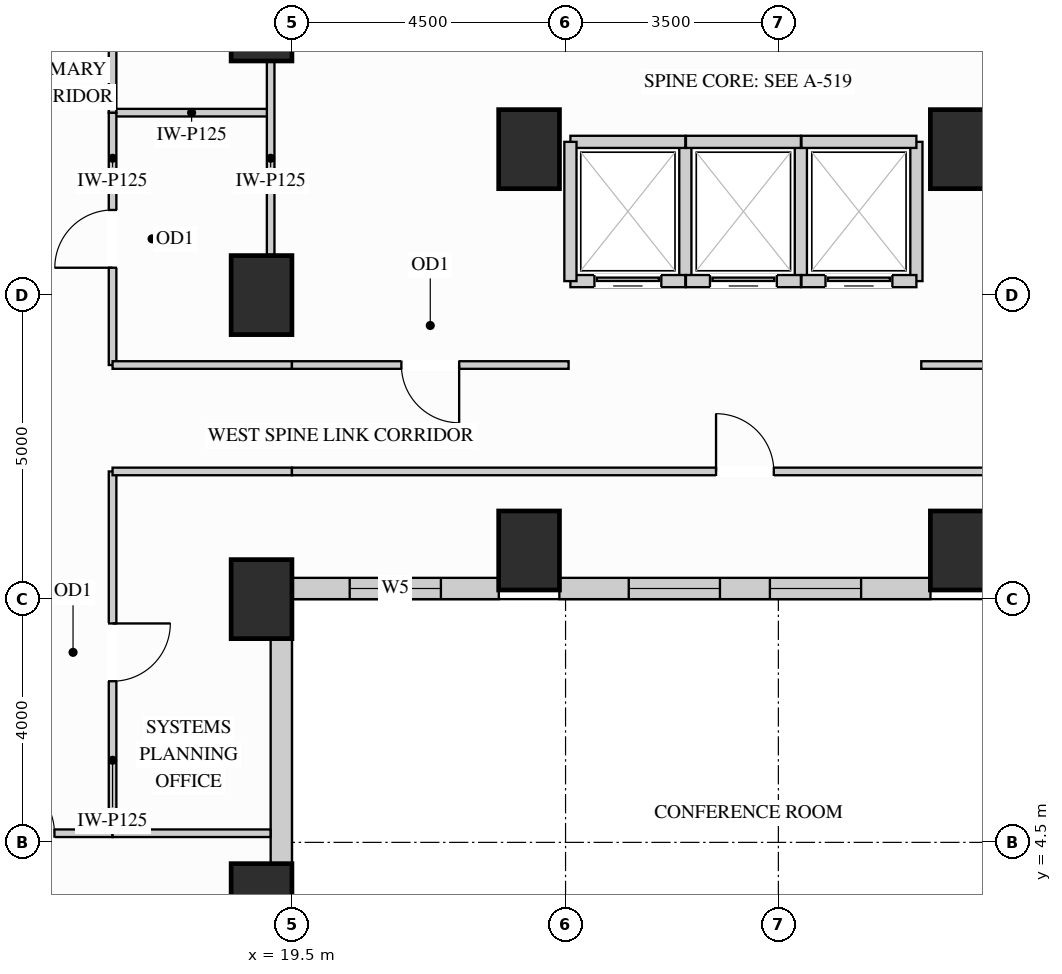
"""IFC4 building model, lengths in metres.
Left out: names, types, materials, properties, quantities, classifications, styles, units other than length and angle.
Written with IfcOpenShell. Run it as: python <this file> out.ifc"""

import sys

from ifc_helpers import new_model, si_unit, direction, frame, frame_2d, origin, origin_2d, place, context, subcontext, project, spatial, rectangle, extrude, source, transform, mapped, element, fill, save


model = new_model("IFC4")
c1 = context("Model", 3, precision=1e-05, world=origin(), true_north=direction((0.0, 1.0)))
c2 = subcontext(c1, "Body", "Model", "MODEL_VIEW")
j1 = project(units=[si_unit("LENGTHUNIT", "METRE"), si_unit("PLANEANGLEUNIT", "RADIAN")], contexts=[c1])
p1 = place(None, origin())
s1 = spatial("IfcSite", under=j1, at=p1, CompositionType="ELEMENT")
p2 = place(p1, origin())
s2 = spatial("IfcBuilding", under=s1, at=p2, CompositionType="ELEMENT")
p3 = place(p2, frame((0.0, 0.0, 65.7)))
s3 = spatial("IfcBuildingStorey", under=s2, at=p3, CompositionType="ELEMENT", Elevation=65.7)
m1 = source(origin(), c2, "Body", "SweptSolid", [
    extrude(rectangle(XDim=1.0, YDim=1.3, at=origin_2d()), origin(), (0.0, 0.0, 1.0), 3.38),
])
for number, where, z_axis, x_axis in (
    (1, (19.0, 13.5, 0.0), (0.0, 0.0, 1.0), (1.0, 0.0, 0.0)),
    (2, (19.0, 18.0, 0.0), (0.0, 0.0, 1.0), (1.0, 0.0, 0.0)),
    (3, (19.0, 3.5, 0.0), (0.0, 0.0, 1.0), (1.0, 0.0, 0.0)),
    (4, (19.0, 8.5, 0.0), (0.0, 0.0, 1.0), (1.0, 0.0, 0.0)),
    (5, (23.4, 15.9, 0.0), (0.0, 0.0, 1.0), (1.0, 0.0, 0.0)),
    (6, (23.4, 9.3, 0.0), (0.0, 0.0, 1.0), (1.0, 0.0, 0.0)),
    (7, (30.5, 15.9, 0.0), (0.0, 0.0, 1.0), (1.0, 0.0, 0.0)),
    (8, (30.5, 9.3, 0.0), (0.0, 0.0, 1.0), (1.0, 0.0, 0.0)),
):
    element("IfcColumn", number, at=place(p3, frame(where, z_axis=z_axis, x_axis=x_axis)), inside=s3, PredefinedType="COLUMN", context=c2, shape_type="MappedRepresentation", body=[
        mapped(m1, transform((0.0, 0.0, 0.0), x_axis=(1.0, 0.0, 0.0), y_axis=(0.0, 1.0, 0.0), z_axis=(0.0, 0.0, 1.0))),
    ])
m2 = source(origin(), c2, "Body", "SweptSolid", [
    extrude(rectangle(XDim=3.704, YDim=0.35, at=frame_2d((1.852, 0.0))), origin(), (0.0, 0.0, 1.0), 2.51),
])
p4 = place(p3, frame((19.325, 4.148, 0.0), z_axis=(0.0, 0.0, 1.0), x_axis=(0.0, 1.0, 0.0)))
e9 = element("IfcWall", 9, at=p4, inside=s3, PredefinedType="SOLIDWALL", context=c2, shape_type="MappedRepresentation", body=[
    mapped(m2, transform((0.0, 0.0, 0.0), x_axis=(1.0, 0.0, 0.0), y_axis=(0.0, 1.0, 0.0), z_axis=(0.0, 0.0, 1.0))),
])
p5 = place(p3, frame((19.498, 8.675, 0.0), z_axis=(0.0, 0.0, 1.0), x_axis=(1.0, 0.0, 0.0)))
e10 = element("IfcWall", 10, at=p5, inside=s3, PredefinedType="SOLIDWALL", context=c2, shape_type="SweptSolid", body=[
    extrude(rectangle(XDim=3.404, YDim=0.35, at=frame_2d((1.702, 0.0))), origin(), (0.0, 0.0, 1.0), 3.365),
])
p6 = place(p5, frame((0.952, 0.0, 0.78)))
e11 = element("IfcOpeningElement", 11, at=p6, cuts=e10, PredefinedType="OPENING", context=c2, shape_type="SweptSolid", body=[
    extrude(rectangle(XDim=1.5, YDim=2.0, at=frame_2d((0.75, 1.0))), frame((0.0, 0.185, 0.0), z_axis=(0.0, -1.0, 0.0), x_axis=(1.0, 0.0, 0.0)), (0.0, 0.0, 1.0), 0.37),
])
p7 = place(p3, frame((23.898, 8.675, 0.0), z_axis=(0.0, 0.0, 1.0), x_axis=(1.0, 0.0, 0.0)))
e12 = element("IfcWall", 12, at=p7, inside=s3, PredefinedType="SOLIDWALL", context=c2, shape_type="SweptSolid", body=[
    extrude(rectangle(XDim=6.104, YDim=0.35, at=frame_2d((3.052, 0.0))), origin(), (0.0, 0.0, 1.0), 3.365),
])
p8 = place(p7, frame((1.141, 0.0, 0.78)))
e13 = element("IfcOpeningElement", 13, at=p8, cuts=e12, PredefinedType="OPENING", context=c2, shape_type="SweptSolid", body=[
    extrude(rectangle(XDim=1.5, YDim=2.0, at=frame_2d((0.75, 1.0))), frame((0.0, 0.185, 0.0), z_axis=(0.0, -1.0, 0.0), x_axis=(1.0, 0.0, 0.0)), (0.0, 0.0, 1.0), 0.37),
])
p9 = place(p7, frame((3.463, 0.0, 0.78)))
e14 = element("IfcOpeningElement", 14, at=p9, cuts=e12, PredefinedType="OPENING", context=c2, shape_type="SweptSolid", body=[
    extrude(rectangle(XDim=1.5, YDim=2.0, at=frame_2d((0.75, 1.0))), frame((0.0, 0.185, 0.0), z_axis=(0.0, -1.0, 0.0), x_axis=(1.0, 0.0, 0.0)), (0.0, 0.0, 1.0), 0.37),
])
m3 = source(origin(), c2, "Body", "SweptSolid", [
    extrude(rectangle(XDim=2.6, YDim=0.125, at=frame_2d((1.3, 0.0))), origin(), (0.0, 0.0, 1.0), 2.896),
])
p10 = place(p3, frame((16.55, 16.5, 0.0), z_axis=(0.0, 0.0, 1.0), x_axis=(1.0, 0.0, 0.0)))
e15 = element("IfcWall", 15, at=p10, inside=s3, PredefinedType="PARTITIONING", context=c2, shape_type="MappedRepresentation", body=[
    mapped(m3, transform((0.0, 0.0, 0.0), x_axis=(1.0, 0.0, 0.0), y_axis=(0.0, 1.0, 0.0), z_axis=(0.0, 0.0, 1.0))),
])
m4 = source(origin(), c2, "Body", "SweptSolid", [
    extrude(rectangle(XDim=3.18, YDim=0.125, at=frame_2d((1.59, 0.0))), origin(), (0.0, 0.0, 1.0), 2.67),
])
p11 = place(p3, frame((19.15, 14.16, 0.0), z_axis=(0.0, 0.0, 1.0), x_axis=(0.0, 1.0, 0.0)))
e16 = element("IfcWall", 16, at=p11, inside=s3, PredefinedType="PARTITIONING", context=c2, shape_type="MappedRepresentation", body=[
    mapped(m4, transform((0.0, 0.0, 0.0), x_axis=(1.0, 0.0, 0.0), y_axis=(0.0, 1.0, 0.0), z_axis=(0.0, 0.0, 1.0))),
])
p12 = place(p3, frame((16.55, 12.35, 0.0), z_axis=(0.0, 0.0, 1.0), x_axis=(0.0, 1.0, 0.0)))
e17 = element("IfcWall", 17, at=p12, inside=s3, PredefinedType="PARTITIONING", context=c2, shape_type="SweptSolid", body=[
    extrude(rectangle(XDim=4.15, YDim=0.125, at=frame_2d((2.075, 0.0))), origin(), (0.0, 0.0, 1.0), 3.365),
])
p13 = place(p12, frame((1.6, 0.0, 0.0)))
e18 = element("IfcOpeningElement", 18, at=p13, cuts=e17, PredefinedType="OPENING", context=c2, shape_type="SweptSolid", body=[
    extrude(rectangle(XDim=0.95, YDim=2.15, at=frame_2d((0.475, 1.075))), frame((0.0, 0.073, 0.0), z_axis=(0.0, -1.0, 0.0), x_axis=(1.0, 0.0, 0.0)), (0.0, 0.0, 1.0), 0.145),
])
p14 = place(p3, frame((16.55, 16.5, 0.0), z_axis=(0.0, 0.0, 1.0), x_axis=(0.0, 1.0, 0.0)))
e19 = element("IfcWall", 19, at=p14, inside=s3, PredefinedType="PARTITIONING", context=c2, shape_type="SweptSolid", body=[
    extrude(rectangle(XDim=6.85, YDim=0.125, at=frame_2d((3.425, 0.0))), origin(), (0.0, 0.0, 1.0), 3.365),
])
p15 = place(p14, frame((2.95, 0.0, 0.0)))
e20 = element("IfcOpeningElement", 20, at=p15, cuts=e19, PredefinedType="OPENING", context=c2, shape_type="SweptSolid", body=[
    extrude(rectangle(XDim=0.95, YDim=2.15, at=frame_2d((0.475, 1.075))), frame((0.0, 0.073, 0.0), z_axis=(0.0, -1.0, 0.0), x_axis=(1.0, 0.0, 0.0)), (0.0, 0.0, 1.0), 0.145),
])
p16 = place(p3, frame((16.55, 4.65, 0.0), z_axis=(0.0, 0.0, 1.0), x_axis=(0.0, 1.0, 0.0)))
e21 = element("IfcWall", 21, at=p16, inside=s3, PredefinedType="PARTITIONING", context=c2, shape_type="SweptSolid", body=[
    extrude(rectangle(XDim=5.95, YDim=0.125, at=frame_2d((2.975, 0.0))), origin(), (0.0, 0.0, 1.0), 3.365),
])
p17 = place(p16, frame((2.5, 0.0, 0.0)))
e22 = element("IfcOpeningElement", 22, at=p17, cuts=e21, PredefinedType="OPENING", context=c2, shape_type="SweptSolid", body=[
    extrude(rectangle(XDim=0.95, YDim=2.15, at=frame_2d((0.475, 1.075))), frame((0.0, 0.073, 0.0), z_axis=(0.0, -1.0, 0.0), x_axis=(1.0, 0.0, 0.0)), (0.0, 0.0, 1.0), 0.145),
])
p18 = place(p3, frame((29.85, 12.35, 0.0), z_axis=(0.0, 0.0, 1.0), x_axis=(1.0, 0.0, 0.0)))
e23 = element("IfcWall", 23, at=p18, inside=s3, PredefinedType="PARTITIONING", context=c2, shape_type="SweptSolid", body=[
    extrude(rectangle(XDim=4.55, YDim=0.125, at=frame_2d((2.275, 0.0))), origin(), (0.0, 0.0, 1.0), 3.365),
])
p19 = place(p18, frame((1.8, 0.0, 0.0)))
e24 = element("IfcOpeningElement", 24, at=p19, cuts=e23, PredefinedType="OPENING", context=c2, shape_type="SweptSolid", body=[
    extrude(rectangle(XDim=0.95, YDim=2.15, at=frame_2d((0.475, 1.075))), frame((0.0, 0.073, 0.0), z_axis=(0.0, -1.0, 0.0), x_axis=(1.0, 0.0, 0.0)), (0.0, 0.0, 1.0), 0.145),
])
m5 = source(origin(), c2, "Body", "SweptSolid", [
    extrude(rectangle(XDim=2.95, YDim=0.125, at=frame_2d((1.475, 0.0))), origin(), (0.0, 0.0, 1.0), 3.365),
])
p20 = place(p3, frame((16.55, 12.35, 0.0), z_axis=(0.0, 0.0, 1.0), x_axis=(1.0, 0.0, 0.0)))
e25 = element("IfcWall", 25, at=p20, inside=s3, PredefinedType="PARTITIONING", context=c2, shape_type="MappedRepresentation", body=[
    mapped(m5, transform((0.0, 0.0, 0.0), x_axis=(1.0, 0.0, 0.0), y_axis=(0.0, 1.0, 0.0), z_axis=(0.0, 0.0, 1.0))),
])
p21 = place(p3, frame((19.5, 12.35, 0.0), z_axis=(0.0, 0.0, 1.0), x_axis=(1.0, 0.0, 0.0)))
e26 = element("IfcWall", 26, at=p21, inside=s3, PredefinedType="PARTITIONING", context=c2, shape_type="SweptSolid", body=[
    extrude(rectangle(XDim=4.55, YDim=0.125, at=frame_2d((2.275, 0.0))), origin(), (0.0, 0.0, 1.0), 3.365),
])
p22 = place(p21, frame((1.8, 0.0, 0.0)))
e27 = element("IfcOpeningElement", 27, at=p22, cuts=e26, PredefinedType="OPENING", context=c2, shape_type="SweptSolid", body=[
    extrude(rectangle(XDim=0.95, YDim=2.15, at=frame_2d((0.475, 1.075))), frame((0.0, 0.073, 0.0), z_axis=(0.0, -1.0, 0.0), x_axis=(1.0, 0.0, 0.0)), (0.0, 0.0, 1.0), 0.145),
])
p23 = place(p3, frame((16.55, 10.6, 0.0), z_axis=(0.0, 0.0, 1.0), x_axis=(1.0, 0.0, 0.0)))
e28 = element("IfcWall", 28, at=p23, inside=s3, PredefinedType="PARTITIONING", context=c2, shape_type="MappedRepresentation", body=[
    mapped(m5, transform((0.0, 0.0, 0.0), x_axis=(1.0, 0.0, 0.0), y_axis=(0.0, 1.0, 0.0), z_axis=(0.0, 0.0, 1.0))),
])
p24 = place(p3, frame((19.5, 10.6, 0.0), z_axis=(0.0, 0.0, 1.0), x_axis=(1.0, 0.0, 0.0)))
e29 = element("IfcWall", 29, at=p24, inside=s3, PredefinedType="PARTITIONING", context=c2, shape_type="SweptSolid", body=[
    extrude(rectangle(XDim=14.9, YDim=0.125, at=frame_2d((7.45, 0.0))), origin(), (0.0, 0.0, 1.0), 3.365),
])
p25 = place(p24, frame((6.975, 0.0, 0.0)))
e30 = element("IfcOpeningElement", 30, at=p25, cuts=e29, PredefinedType="OPENING", context=c2, shape_type="SweptSolid", body=[
    extrude(rectangle(XDim=0.95, YDim=2.15, at=frame_2d((0.475, 1.075))), frame((0.0, 0.073, 0.0), z_axis=(0.0, -1.0, 0.0), x_axis=(1.0, 0.0, 0.0)), (0.0, 0.0, 1.0), 0.145),
])
p26 = place(p3, frame((13.688, 4.65, 0.0), z_axis=(0.0, 0.0, 1.0), x_axis=(1.0, 0.0, 0.0)))
e31 = element("IfcWall", 31, at=p26, inside=s3, PredefinedType="PARTITIONING", context=c2, shape_type="SweptSolid", body=[
    extrude(rectangle(XDim=2.862, YDim=0.125, at=frame_2d((1.431, 0.0))), origin(), (0.0, 0.0, 1.0), 2.828),
])
p27 = place(p26, frame((0.956, 0.0, 0.0)))
e32 = element("IfcOpeningElement", 32, at=p27, cuts=e31, PredefinedType="OPENING", context=c2, shape_type="SweptSolid", body=[
    extrude(rectangle(XDim=0.95, YDim=2.15, at=frame_2d((0.475, 1.075))), frame((0.0, 0.073, 0.0), z_axis=(0.0, -1.0, 0.0), x_axis=(1.0, 0.0, 0.0)), (0.0, 0.0, 1.0), 0.145),
])
m6 = source(origin(), c2, "Body", "SweptSolid", [
    extrude(rectangle(XDim=2.598, YDim=0.125, at=frame_2d((1.299, 0.0))), origin(), (0.0, 0.0, 1.0), 2.828),
])
p28 = place(p3, frame((16.55, 4.65, 0.0), z_axis=(0.0, 0.0, 1.0), x_axis=(1.0, 0.0, 0.0)))
e33 = element("IfcWall", 33, at=p28, inside=s3, PredefinedType="PARTITIONING", context=c2, shape_type="MappedRepresentation", body=[
    mapped(m6, transform((0.0, 0.0, 0.0), x_axis=(1.0, 0.0, 0.0), y_axis=(0.0, 1.0, 0.0), z_axis=(0.0, 0.0, 1.0))),
])
m7 = source(origin(), c2, "Body", "SweptSolid", [
    extrude(rectangle(XDim=2.29, YDim=0.2, at=frame_2d((1.145, 0.0))), origin(), (0.0, 0.0, 1.0), 3.365),
])
p29 = place(p3, frame((25.97, 13.73, 0.0), z_axis=(0.0, 0.0, 1.0), x_axis=(0.0, 1.0, 0.0)))
e34 = element("IfcWall", 34, at=p29, inside=s3, PredefinedType="PARTITIONING", context=c2, shape_type="MappedRepresentation", body=[
    mapped(m7, transform((0.0, 0.0, 0.0), x_axis=(1.0, 0.0, 0.0), y_axis=(0.0, 1.0, 0.0), z_axis=(0.0, 0.0, 1.0))),
])
m8 = source(origin(), c2, "Body", "SweptSolid", [
    extrude(rectangle(XDim=1.89, YDim=0.2, at=frame_2d((0.945, 0.0))), origin(), (0.0, 0.0, 1.0), 2.67),
])
p30 = place(p3, frame((24.08, 16.02, 0.0), z_axis=(0.0, 0.0, 1.0), x_axis=(1.0, 0.0, 0.0)))
e35 = element("IfcWall", 35, at=p30, inside=s3, PredefinedType="PARTITIONING", context=c2, shape_type="MappedRepresentation", body=[
    mapped(m8, transform((0.0, 0.0, 0.0), x_axis=(1.0, 0.0, 0.0), y_axis=(0.0, 1.0, 0.0), z_axis=(0.0, 0.0, 1.0))),
])
p31 = place(p3, frame((24.08, 13.73, 0.0), z_axis=(0.0, 0.0, 1.0), x_axis=(1.0, 0.0, 0.0)))
e36 = element("IfcWall", 36, at=p31, inside=s3, PredefinedType="PARTITIONING", context=c2, shape_type="SweptSolid", body=[
    extrude(rectangle(XDim=1.89, YDim=0.2, at=frame_2d((0.945, 0.0))), origin(), (0.0, 0.0, 1.0), 2.446),
])
p32 = place(p31, frame((0.395, 0.0, 0.0)))
e37 = element("IfcOpeningElement", 37, at=p32, cuts=e36, PredefinedType="OPENING", context=c2, shape_type="SweptSolid", body=[
    extrude(rectangle(XDim=1.1, YDim=2.2, at=frame_2d((0.55, 1.1))), frame((0.0, 0.11, 0.0), z_axis=(0.0, -1.0, 0.0), x_axis=(1.0, 0.0, 0.0)), (0.0, 0.0, 1.0), 0.22),
])
for number, where, z_axis, x_axis in (
    (38, (24.08, 13.73, 0.0), (0.0, 0.0, 1.0), (0.0, 1.0, 0.0)),
    (39, (27.87, 13.73, 0.0), (0.0, 0.0, 1.0), (0.0, 1.0, 0.0)),
):
    element("IfcWall", number, at=place(p3, frame(where, z_axis=z_axis, x_axis=x_axis)), inside=s3, PredefinedType="PARTITIONING", context=c2, shape_type="MappedRepresentation", body=[
        mapped(m7, transform((0.0, 0.0, 0.0), x_axis=(1.0, 0.0, 0.0), y_axis=(0.0, 1.0, 0.0), z_axis=(0.0, 0.0, 1.0))),
    ])
m9 = source(origin(), c2, "Body", "SweptSolid", [
    extrude(rectangle(XDim=1.89, YDim=0.2, at=frame_2d((0.945, 0.0))), origin(), (0.0, 0.0, 1.0), 2.67),
])
p33 = place(p3, frame((25.98, 16.02, 0.0), z_axis=(0.0, 0.0, 1.0), x_axis=(1.0, 0.0, 0.0)))
e40 = element("IfcWall", 40, at=p33, inside=s3, PredefinedType="PARTITIONING", context=c2, shape_type="MappedRepresentation", body=[
    mapped(m9, transform((0.0, 0.0, 0.0), x_axis=(1.0, 0.0, 0.0), y_axis=(0.0, 1.0, 0.0), z_axis=(0.0, 0.0, 1.0))),
])
p34 = place(p3, frame((25.98, 13.73, 0.0), z_axis=(0.0, 0.0, 1.0), x_axis=(1.0, 0.0, 0.0)))
e41 = element("IfcWall", 41, at=p34, inside=s3, PredefinedType="PARTITIONING", context=c2, shape_type="SweptSolid", body=[
    extrude(rectangle(XDim=1.89, YDim=0.2, at=frame_2d((0.945, 0.0))), origin(), (0.0, 0.0, 1.0), 2.446),
])
p35 = place(p34, frame((0.395, 0.0, 0.0)))
e42 = element("IfcOpeningElement", 42, at=p35, cuts=e41, PredefinedType="OPENING", context=c2, shape_type="SweptSolid", body=[
    extrude(rectangle(XDim=1.1, YDim=2.2, at=frame_2d((0.55, 1.1))), frame((0.0, 0.11, 0.0), z_axis=(0.0, -1.0, 0.0), x_axis=(1.0, 0.0, 0.0)), (0.0, 0.0, 1.0), 0.22),
])
p36 = place(p3, frame((29.77, 13.73, 0.0), z_axis=(0.0, 0.0, 1.0), x_axis=(0.0, 1.0, 0.0)))
e43 = element("IfcWall", 43, at=p36, inside=s3, PredefinedType="PARTITIONING", context=c2, shape_type="MappedRepresentation", body=[
    mapped(m7, transform((0.0, 0.0, 0.0), x_axis=(1.0, 0.0, 0.0), y_axis=(0.0, 1.0, 0.0), z_axis=(0.0, 0.0, 1.0))),
])
p37 = place(p3, frame((27.88, 16.02, 0.0), z_axis=(0.0, 0.0, 1.0), x_axis=(1.0, 0.0, 0.0)))
e44 = element("IfcWall", 44, at=p37, inside=s3, PredefinedType="PARTITIONING", context=c2, shape_type="MappedRepresentation", body=[
    mapped(m9, transform((0.0, 0.0, 0.0), x_axis=(1.0, 0.0, 0.0), y_axis=(0.0, 1.0, 0.0), z_axis=(0.0, 0.0, 1.0))),
])
p38 = place(p3, frame((27.88, 13.73, 0.0), z_axis=(0.0, 0.0, 1.0), x_axis=(1.0, 0.0, 0.0)))
e45 = element("IfcWall", 45, at=p38, inside=s3, PredefinedType="PARTITIONING", context=c2, shape_type="SweptSolid", body=[
    extrude(rectangle(XDim=1.89, YDim=0.2, at=frame_2d((0.945, 0.0))), origin(), (0.0, 0.0, 1.0), 2.446),
])
p39 = place(p38, frame((0.395, 0.0, 0.0)))
e46 = element("IfcOpeningElement", 46, at=p39, cuts=e45, PredefinedType="OPENING", context=c2, shape_type="SweptSolid", body=[
    extrude(rectangle(XDim=1.1, YDim=2.2, at=frame_2d((0.55, 1.1))), frame((0.0, 0.11, 0.0), z_axis=(0.0, -1.0, 0.0), x_axis=(1.0, 0.0, 0.0)), (0.0, 0.0, 1.0), 0.22),
])
m10 = source(origin(), c2, "Body", "SweptSolid", [
    extrude(rectangle(XDim=1.1, YDim=2.2, at=frame_2d((0.55, 1.1))), frame((0.0, 0.025, 0.0), z_axis=(0.0, -1.0, 0.0), x_axis=(1.0, 0.0, 0.0)), (0.0, 0.0, 1.0), 0.05),
])
p40 = place(p32, origin())
e47 = element("IfcDoor", 47, at=p40, inside=s3, OperationType="SLIDING_TO_LEFT", PredefinedType="DOOR", context=c2, shape_type="MappedRepresentation", body=[
    mapped(m10, transform((0.0, 0.0, 0.0), x_axis=(1.0, 0.0, 0.0), y_axis=(0.0, 1.0, 0.0), z_axis=(0.0, 0.0, 1.0))),
])
fill(e37, e47)
p41 = place(p35, origin())
e48 = element("IfcDoor", 48, at=p41, inside=s3, OperationType="SLIDING_TO_LEFT", PredefinedType="DOOR", context=c2, shape_type="MappedRepresentation", body=[
    mapped(m10, transform((0.0, 0.0, 0.0), x_axis=(1.0, 0.0, 0.0), y_axis=(0.0, 1.0, 0.0), z_axis=(0.0, 0.0, 1.0))),
])
fill(e42, e48)
p42 = place(p39, origin())
e49 = element("IfcDoor", 49, at=p42, inside=s3, OperationType="SLIDING_TO_LEFT", PredefinedType="DOOR", context=c2, shape_type="MappedRepresentation", body=[
    mapped(m10, transform((0.0, 0.0, 0.0), x_axis=(1.0, 0.0, 0.0), y_axis=(0.0, 1.0, 0.0), z_axis=(0.0, 0.0, 1.0))),
])
fill(e46, e49)
m11 = source(origin(), c2, "Body", "SweptSolid", [
    extrude(rectangle(XDim=0.95, YDim=2.15, at=frame_2d((0.475, 1.075))), frame((0.0, 0.025, 0.0), z_axis=(0.0, -1.0, 0.0), x_axis=(1.0, 0.0, 0.0)), (0.0, 0.0, 1.0), 0.05),
])
p43 = place(p17, origin())
e50 = element("IfcDoor", 50, at=p43, inside=s3, OperationType="SINGLE_SWING_RIGHT", PredefinedType="DOOR", context=c2, shape_type="MappedRepresentation", body=[
    mapped(m11, transform((0.0, 0.0, 0.0), x_axis=(1.0, 0.0, 0.0), y_axis=(0.0, 1.0, 0.0), z_axis=(0.0, 0.0, 1.0))),
])
fill(e22, e50)
p44 = place(p13, origin())
e51 = element("IfcDoor", 51, at=p44, inside=s3, OperationType="SINGLE_SWING_LEFT", PredefinedType="DOOR", context=c2, shape_type="MappedRepresentation", body=[
    mapped(m11, transform((0.0, 0.0, 0.0), x_axis=(1.0, 0.0, 0.0), y_axis=(0.0, 1.0, 0.0), z_axis=(0.0, 0.0, 1.0))),
])
fill(e18, e51)
p45 = place(p27, origin())
e52 = element("IfcDoor", 52, at=p45, inside=s3, OperationType="SINGLE_SWING_LEFT", PredefinedType="DOOR", context=c2, shape_type="MappedRepresentation", body=[
    mapped(m11, transform((0.0, 0.0, 0.0), x_axis=(1.0, 0.0, 0.0), y_axis=(0.0, 1.0, 0.0), z_axis=(0.0, 0.0, 1.0))),
])
fill(e32, e52)
p46 = place(p22, origin())
e53 = element("IfcDoor", 53, at=p46, inside=s3, OperationType="SINGLE_SWING_RIGHT", PredefinedType="DOOR", context=c2, shape_type="MappedRepresentation", body=[
    mapped(m11, transform((0.0, 0.0, 0.0), x_axis=(1.0, 0.0, 0.0), y_axis=(0.0, 1.0, 0.0), z_axis=(0.0, 0.0, 1.0))),
])
fill(e27, e53)
p47 = place(p25, origin())
e54 = element("IfcDoor", 54, at=p47, inside=s3, OperationType="SINGLE_SWING_LEFT", PredefinedType="DOOR", context=c2, shape_type="MappedRepresentation", body=[
    mapped(m11, transform((0.0, 0.0, 0.0), x_axis=(1.0, 0.0, 0.0), y_axis=(0.0, 1.0, 0.0), z_axis=(0.0, 0.0, 1.0))),
])
fill(e30, e54)
m12 = source(origin(), c2, "Body", "SweptSolid", [
    extrude(rectangle(XDim=1.5, YDim=2.0, at=frame_2d((0.75, 1.0))), frame((0.0, 0.03, 0.0), z_axis=(0.0, -1.0, 0.0), x_axis=(1.0, 0.0, 0.0)), (0.0, 0.0, 1.0), 0.06),
])
p48 = place(p6, origin())
e55 = element("IfcWindow", 55, at=p48, inside=s3, PartitioningType="SINGLE_PANEL", PredefinedType="WINDOW", context=c2, shape_type="MappedRepresentation", body=[
    mapped(m12, transform((0.0, 0.0, 0.0), x_axis=(1.0, 0.0, 0.0), y_axis=(0.0, 1.0, 0.0), z_axis=(0.0, 0.0, 1.0))),
])
fill(e11, e55)
p49 = place(p8, origin())
e56 = element("IfcWindow", 56, at=p49, inside=s3, PartitioningType="SINGLE_PANEL", PredefinedType="WINDOW", context=c2, shape_type="MappedRepresentation", body=[
    mapped(m12, transform((0.0, 0.0, 0.0), x_axis=(1.0, 0.0, 0.0), y_axis=(0.0, 1.0, 0.0), z_axis=(0.0, 0.0, 1.0))),
])
fill(e13, e56)
p50 = place(p9, origin())
e57 = element("IfcWindow", 57, at=p50, inside=s3, PartitioningType="SINGLE_PANEL", PredefinedType="WINDOW", context=c2, shape_type="MappedRepresentation", body=[
    mapped(m12, transform((0.0, 0.0, 0.0), x_axis=(1.0, 0.0, 0.0), y_axis=(0.0, 1.0, 0.0), z_axis=(0.0, 0.0, 1.0))),
])
fill(e14, e57)
save(model, sys.argv[1])
